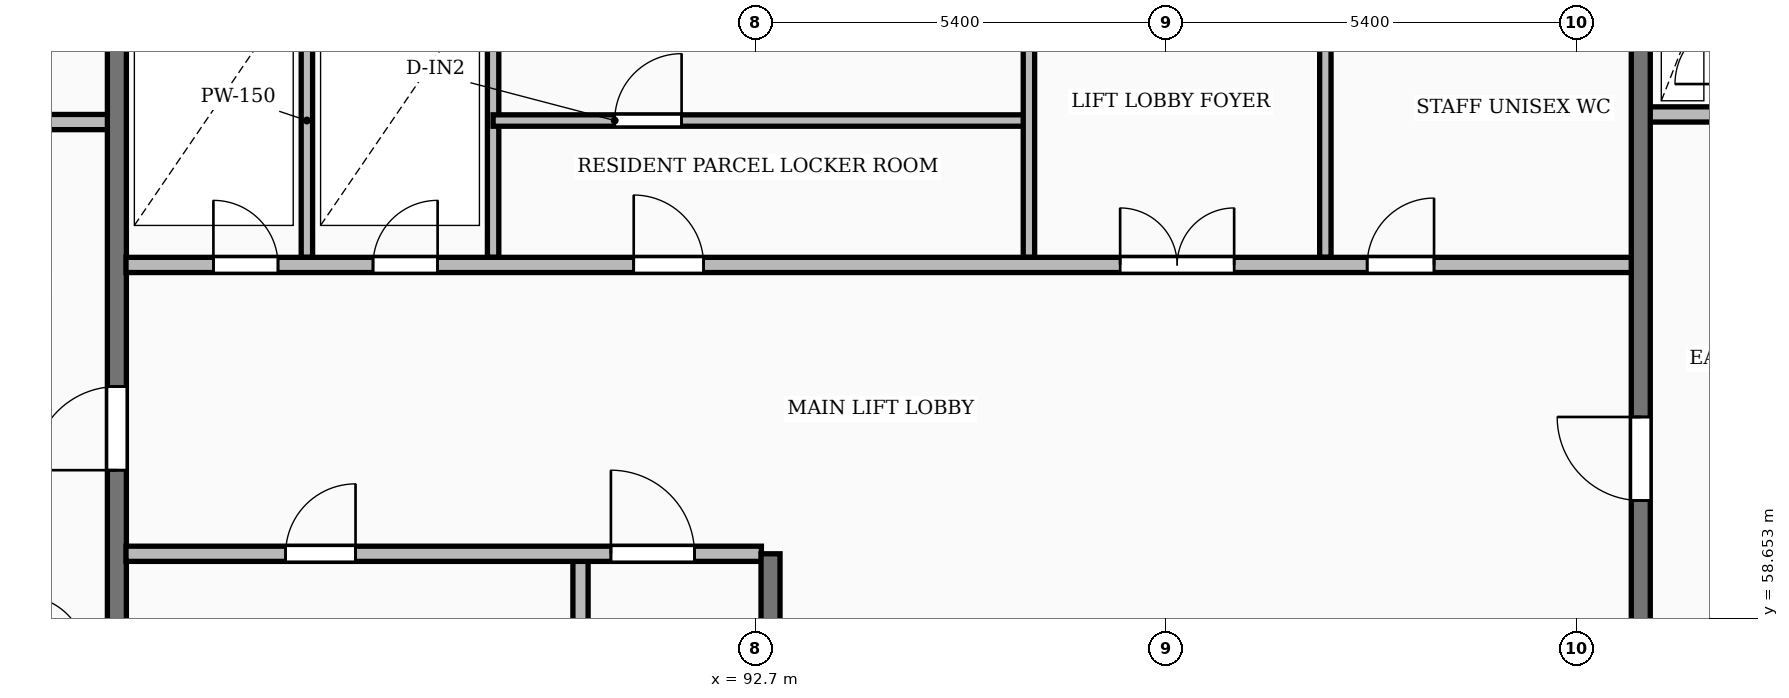
"""IFC4 building model, lengths in metres.
Left out: names, types, materials, properties, quantities, classifications, styles, units other than length and angle.
Written with IfcOpenShell. Run it as: python <this file> out.ifc"""

import sys

from ifc_helpers import new_model, si_unit, direction, frame, frame_2d, origin, place, context, subcontext, project, spatial, rectangle, extrude, element, fill, save


model = new_model("IFC4")
c1 = context("Model", 3, precision=1e-05, world=origin(), true_north=direction((0.0, 1.0)))
c2 = subcontext(c1, "Body", "Model", "MODEL_VIEW")
j1 = project(units=[si_unit("LENGTHUNIT", "METRE"), si_unit("PLANEANGLEUNIT", "RADIAN")], contexts=[c1])
p1 = place(None, origin())
s1 = spatial("IfcSite", under=j1, at=p1, CompositionType="ELEMENT")
p2 = place(p1, origin())
s2 = spatial("IfcBuilding", under=s1, at=p2, CompositionType="ELEMENT")
p3 = place(p2, frame((0.0, 0.0, 142.9)))
s3 = spatial("IfcBuildingStorey", under=s2, at=p3, CompositionType="ELEMENT", Elevation=142.9)
p4 = place(p3, frame((79.79, 65.18, 0.0), z_axis=(0.0, 0.0, 1.0), x_axis=(1.0, 0.0, 0.0)))
e1 = element("IfcWall", 1, at=p4, inside=s3, PredefinedType="PARTITIONING", context=c2, shape_type="SweptSolid", body=[
    extrude(rectangle(XDim=4.39, YDim=0.2, at=frame_2d((2.195, 0.0))), origin(), (0.0, 0.0, 1.0), 3.31),
])
p5 = place(p4, frame((1.5, 0.0, 0.0)))
e2 = element("IfcOpeningElement", 2, at=p5, cuts=e1, PredefinedType="OPENING", context=c2, shape_type="SweptSolid", body=[
    extrude(rectangle(XDim=1.1, YDim=2.1, at=frame_2d((0.55, 1.05))), frame((0.0, 0.11, 0.0), z_axis=(0.0, -1.0, 0.0), x_axis=(1.0, 0.0, 0.0)), (0.0, 0.0, 1.0), 0.22),
])
p6 = place(p3, frame((84.3, 55.4, 0.0), z_axis=(0.0, 0.0, 1.0), x_axis=(0.0, 1.0, 0.0)))
e3 = element("IfcWall", 3, at=p6, inside=s3, PredefinedType="SHEAR", context=c2, shape_type="SweptSolid", body=[
    extrude(rectangle(XDim=11.6, YDim=0.25, at=frame_2d((5.8, 0.0))), origin(), (0.0, 0.0, 1.0), 3.6),
])
p7 = place(p6, frame((5.2, 0.0, 0.0)))
e4 = element("IfcOpeningElement", 4, at=p7, cuts=e3, PredefinedType="OPENING", context=c2, shape_type="SweptSolid", body=[
    extrude(rectangle(XDim=1.1, YDim=2.1, at=frame_2d((0.55, 1.05))), frame((0.0, 0.135, 0.0), z_axis=(0.0, -1.0, 0.0), x_axis=(1.0, 0.0, 0.0)), (0.0, 0.0, 1.0), 0.27),
])
p8 = place(p3, frame((90.4, 55.4, 0.0), z_axis=(0.0, 0.0, 1.0), x_axis=(0.0, 1.0, 0.0)))
e5 = element("IfcWall", 5, at=p8, inside=s3, PredefinedType="PARTITIONING", context=c2, shape_type="SweptSolid", body=[
    extrude(rectangle(XDim=4.1, YDim=0.2, at=frame_2d((2.05, 0.0))), origin(), (0.0, 0.0, 1.0), 3.31),
])
p9 = place(p3, frame((84.42, 59.5, 0.0), z_axis=(0.0, 0.0, 1.0), x_axis=(1.0, 0.0, 0.0)))
e6 = element("IfcWall", 6, at=p9, inside=s3, PredefinedType="PARTITIONING", context=c2, shape_type="SweptSolid", body=[
    extrude(rectangle(XDim=8.36, YDim=0.2, at=frame_2d((4.18, 0.0))), origin(), (0.0, 0.0, 1.0), 3.31),
])
p10 = place(p9, frame((2.1, 0.0, 0.0)))
e7 = element("IfcOpeningElement", 7, at=p10, cuts=e6, PredefinedType="OPENING", context=c2, shape_type="SweptSolid", body=[
    extrude(rectangle(XDim=0.92, YDim=2.08, at=frame_2d((0.46, 1.04))), frame((0.0, 0.11, 0.0), z_axis=(0.0, -1.0, 0.0), x_axis=(1.0, 0.0, 0.0)), (0.0, 0.0, 1.0), 0.22),
])
p11 = place(p9, frame((6.38, 0.0, 0.0)))
e8 = element("IfcOpeningElement", 8, at=p11, cuts=e6, PredefinedType="OPENING", context=c2, shape_type="SweptSolid", body=[
    extrude(rectangle(XDim=1.1, YDim=2.1, at=frame_2d((0.55, 1.05))), frame((0.0, 0.11, 0.0), z_axis=(0.0, -1.0, 0.0), x_axis=(1.0, 0.0, 0.0)), (0.0, 0.0, 1.0), 0.22),
])
p12 = place(p3, frame((92.9, 55.4, 0.0), z_axis=(0.0, 0.0, 1.0), x_axis=(0.0, 1.0, 0.0)))
e9 = element("IfcWall", 9, at=p12, inside=s3, PredefinedType="SHEAR", context=c2, shape_type="SweptSolid", body=[
    extrude(rectangle(XDim=4.1, YDim=0.25, at=frame_2d((2.05, 0.0))), origin(), (0.0, 0.0, 1.0), 3.6),
])
for number, where, z_axis, x_axis in (
    (10, (86.8, 63.4, 0.0), (0.0, 0.0, 1.0), (0.0, 1.0, 0.0)),
    (11, (89.25, 63.4, 0.0), (0.0, 0.0, 1.0), (0.0, 1.0, 0.0)),
):
    element("IfcWall", number, at=place(p3, frame(where, z_axis=z_axis, x_axis=x_axis)), inside=s3, PredefinedType="PARTITIONING", context=c2, shape_type="SweptSolid", body=[
        extrude(rectangle(XDim=3.6, YDim=0.15, at=frame_2d((1.8, 0.0))), origin(), (0.0, 0.0, 1.0), 3.31),
    ])
p13 = place(p3, frame((89.25, 65.2, 0.0), z_axis=(0.0, 0.0, 1.0), x_axis=(1.0, 0.0, 0.0)))
e12 = element("IfcWall", 12, at=p13, inside=s3, PredefinedType="PARTITIONING", context=c2, shape_type="SweptSolid", body=[
    extrude(rectangle(XDim=7.05, YDim=0.15, at=frame_2d((3.525, 0.0))), origin(), (0.0, 0.0, 1.0), 3.31),
])
p14 = place(p13, frame((1.6, 0.0, 0.0)))
e13 = element("IfcOpeningElement", 13, at=p14, cuts=e12, PredefinedType="OPENING", context=c2, shape_type="SweptSolid", body=[
    extrude(rectangle(XDim=0.88, YDim=2.06, at=frame_2d((0.44, 1.03))), frame((0.0, 0.085, 0.0), z_axis=(0.0, -1.0, 0.0), x_axis=(1.0, 0.0, 0.0)), (0.0, 0.0, 1.0), 0.17),
])
for number, where, z_axis, x_axis in (
    (14, (96.3, 63.4, 0.0), (0.0, 0.0, 1.0), (0.0, 1.0, 0.0)),
    (15, (100.2, 63.4, 0.0), (0.0, 0.0, 1.0), (0.0, 1.0, 0.0)),
):
    element("IfcWall", number, at=place(p3, frame(where, z_axis=z_axis, x_axis=x_axis)), inside=s3, PredefinedType="PARTITIONING", context=c2, shape_type="SweptSolid", body=[
        extrude(rectangle(XDim=3.6, YDim=0.15, at=frame_2d((1.8, 0.0))), origin(), (0.0, 0.0, 1.0), 3.31),
    ])
p15 = place(p3, frame((84.42, 63.3, 0.0), z_axis=(0.0, 0.0, 1.0), x_axis=(1.0, 0.0, 0.0)))
e16 = element("IfcWall", 16, at=p15, inside=s3, PredefinedType="PARTITIONING", context=c2, shape_type="SweptSolid", body=[
    extrude(rectangle(XDim=19.83, YDim=0.2, at=frame_2d((9.915, 0.0))), origin(), (0.0, 0.0, 1.0), 3.31),
])
p16 = place(p15, frame((1.15, 0.0, 0.0)))
e17 = element("IfcOpeningElement", 17, at=p16, cuts=e16, PredefinedType="OPENING", context=c2, shape_type="SweptSolid", body=[
    extrude(rectangle(XDim=0.85, YDim=2.05, at=frame_2d((0.425, 1.025))), frame((0.0, 0.11, 0.0), z_axis=(0.0, -1.0, 0.0), x_axis=(1.0, 0.0, 0.0)), (0.0, 0.0, 1.0), 0.22),
])
p17 = place(p15, frame((3.25, 0.0, 0.0)))
e18 = element("IfcOpeningElement", 18, at=p17, cuts=e16, PredefinedType="OPENING", context=c2, shape_type="SweptSolid", body=[
    extrude(rectangle(XDim=0.85, YDim=2.05, at=frame_2d((0.425, 1.025))), frame((0.0, 0.11, 0.0), z_axis=(0.0, -1.0, 0.0), x_axis=(1.0, 0.0, 0.0)), (0.0, 0.0, 1.0), 0.22),
])
p18 = place(p15, frame((13.08, 0.0, 0.0)))
e19 = element("IfcOpeningElement", 19, at=p18, cuts=e16, PredefinedType="OPENING", context=c2, shape_type="SweptSolid", body=[
    extrude(rectangle(XDim=1.5, YDim=2.2, at=frame_2d((0.75, 1.1))), frame((0.0, 0.11, 0.0), z_axis=(0.0, -1.0, 0.0), x_axis=(1.0, 0.0, 0.0)), (0.0, 0.0, 1.0), 0.22),
])
p19 = place(p15, frame((6.68, 0.0, 0.0)))
e20 = element("IfcOpeningElement", 20, at=p19, cuts=e16, PredefinedType="OPENING", context=c2, shape_type="SweptSolid", body=[
    extrude(rectangle(XDim=0.92, YDim=2.08, at=frame_2d((0.46, 1.04))), frame((0.0, 0.11, 0.0), z_axis=(0.0, -1.0, 0.0), x_axis=(1.0, 0.0, 0.0)), (0.0, 0.0, 1.0), 0.22),
])
p20 = place(p15, frame((16.33, 0.0, 0.0)))
e21 = element("IfcOpeningElement", 21, at=p20, cuts=e16, PredefinedType="OPENING", context=c2, shape_type="SweptSolid", body=[
    extrude(rectangle(XDim=0.88, YDim=2.06, at=frame_2d((0.44, 1.03))), frame((0.0, 0.11, 0.0), z_axis=(0.0, -1.0, 0.0), x_axis=(1.0, 0.0, 0.0)), (0.0, 0.0, 1.0), 0.22),
])
p21 = place(p3, frame((104.45, 65.28, 0.0), z_axis=(0.0, 0.0, 1.0), x_axis=(1.0, 0.0, 0.0)))
e22 = element("IfcWall", 22, at=p21, inside=s3, PredefinedType="PARTITIONING", context=c2, shape_type="SweptSolid", body=[
    extrude(rectangle(XDim=1.2, YDim=0.2, at=frame_2d((0.6, 0.0))), origin(), (0.0, 0.0, 1.0), 3.31),
])
p22 = place(p3, frame((104.35, 58.4, 0.0), z_axis=(0.0, 0.0, 1.0), x_axis=(0.0, 1.0, 0.0)))
e23 = element("IfcWall", 23, at=p22, inside=s3, PredefinedType="SHEAR", context=c2, shape_type="SweptSolid", body=[
    extrude(rectangle(XDim=8.6, YDim=0.25, at=frame_2d((4.3, 0.0))), origin(), (0.0, 0.0, 1.0), 3.6),
])
p23 = place(p22, frame((1.8, 0.0, 0.0)))
e24 = element("IfcOpeningElement", 24, at=p23, cuts=e23, PredefinedType="OPENING", context=c2, shape_type="SweptSolid", body=[
    extrude(rectangle(XDim=1.1, YDim=2.1, at=frame_2d((0.55, 1.05))), frame((0.0, 0.135, 0.0), z_axis=(0.0, -1.0, 0.0), x_axis=(1.0, 0.0, 0.0)), (0.0, 0.0, 1.0), 0.27),
])
p24 = place(p7, origin())
e25 = element("IfcDoor", 25, at=p24, inside=s3, OperationType="SINGLE_SWING_LEFT", PredefinedType="DOOR", context=c2, shape_type="SweptSolid", body=[
    extrude(rectangle(XDim=1.1, YDim=2.1, at=frame_2d((0.55, 1.05))), frame((0.0, 0.025, 0.0), z_axis=(0.0, -1.0, 0.0), x_axis=(1.0, 0.0, 0.0)), (0.0, 0.0, 1.0), 0.05),
])
fill(e4, e25)
p25 = place(p10, origin())
e26 = element("IfcDoor", 26, at=p25, inside=s3, OperationType="SINGLE_SWING_RIGHT", PredefinedType="DOOR", context=c2, shape_type="SweptSolid", body=[
    extrude(rectangle(XDim=0.92, YDim=2.08, at=frame_2d((0.46, 1.04))), frame((0.0, 0.025, 0.0), z_axis=(0.0, -1.0, 0.0), x_axis=(1.0, 0.0, 0.0)), (0.0, 0.0, 1.0), 0.05),
])
fill(e7, e26)
p26 = place(p11, origin())
e27 = element("IfcDoor", 27, at=p26, inside=s3, OperationType="SINGLE_SWING_LEFT", PredefinedType="DOOR", context=c2, shape_type="SweptSolid", body=[
    extrude(rectangle(XDim=1.1, YDim=2.1, at=frame_2d((0.55, 1.05))), frame((0.0, 0.025, 0.0), z_axis=(0.0, -1.0, 0.0), x_axis=(1.0, 0.0, 0.0)), (0.0, 0.0, 1.0), 0.05),
])
fill(e8, e27)
p27 = place(p14, origin())
e28 = element("IfcDoor", 28, at=p27, inside=s3, OperationType="SINGLE_SWING_RIGHT", PredefinedType="DOOR", context=c2, shape_type="SweptSolid", body=[
    extrude(rectangle(XDim=0.88, YDim=2.06, at=frame_2d((0.44, 1.03))), frame((0.0, 0.025, 0.0), z_axis=(0.0, -1.0, 0.0), x_axis=(1.0, 0.0, 0.0)), (0.0, 0.0, 1.0), 0.05),
])
fill(e13, e28)
p28 = place(p16, origin())
e29 = element("IfcDoor", 29, at=p28, inside=s3, OperationType="SINGLE_SWING_LEFT", PredefinedType="DOOR", context=c2, shape_type="SweptSolid", body=[
    extrude(rectangle(XDim=0.85, YDim=2.05, at=frame_2d((0.425, 1.025))), frame((0.0, 0.025, 0.0), z_axis=(0.0, -1.0, 0.0), x_axis=(1.0, 0.0, 0.0)), (0.0, 0.0, 1.0), 0.05),
])
fill(e17, e29)
p29 = place(p17, origin())
e30 = element("IfcDoor", 30, at=p29, inside=s3, OperationType="SINGLE_SWING_RIGHT", PredefinedType="DOOR", context=c2, shape_type="SweptSolid", body=[
    extrude(rectangle(XDim=0.85, YDim=2.05, at=frame_2d((0.425, 1.025))), frame((0.0, 0.025, 0.0), z_axis=(0.0, -1.0, 0.0), x_axis=(1.0, 0.0, 0.0)), (0.0, 0.0, 1.0), 0.05),
])
fill(e18, e30)
p30 = place(p18, origin())
e31 = element("IfcDoor", 31, at=p30, inside=s3, OperationType="DOUBLE_DOOR_SINGLE_SWING", PredefinedType="DOOR", context=c2, shape_type="SweptSolid", body=[
    extrude(rectangle(XDim=1.5, YDim=2.2, at=frame_2d((0.75, 1.1))), frame((0.0, 0.025, 0.0), z_axis=(0.0, -1.0, 0.0), x_axis=(1.0, 0.0, 0.0)), (0.0, 0.0, 1.0), 0.05),
])
fill(e19, e31)
p31 = place(p19, origin())
e32 = element("IfcDoor", 32, at=p31, inside=s3, OperationType="SINGLE_SWING_LEFT", PredefinedType="DOOR", context=c2, shape_type="SweptSolid", body=[
    extrude(rectangle(XDim=0.92, YDim=2.08, at=frame_2d((0.46, 1.04))), frame((0.0, 0.025, 0.0), z_axis=(0.0, -1.0, 0.0), x_axis=(1.0, 0.0, 0.0)), (0.0, 0.0, 1.0), 0.05),
])
fill(e20, e32)
p32 = place(p20, origin())
e33 = element("IfcDoor", 33, at=p32, inside=s3, OperationType="SINGLE_SWING_RIGHT", PredefinedType="DOOR", context=c2, shape_type="SweptSolid", body=[
    extrude(rectangle(XDim=0.88, YDim=2.06, at=frame_2d((0.44, 1.03))), frame((0.0, 0.025, 0.0), z_axis=(0.0, -1.0, 0.0), x_axis=(1.0, 0.0, 0.0)), (0.0, 0.0, 1.0), 0.05),
])
fill(e21, e33)
p33 = place(p23, origin())
e34 = element("IfcDoor", 34, at=p33, inside=s3, OperationType="SINGLE_SWING_RIGHT", PredefinedType="DOOR", context=c2, shape_type="SweptSolid", body=[
    extrude(rectangle(XDim=1.1, YDim=2.1, at=frame_2d((0.55, 1.05))), frame((0.0, 0.025, 0.0), z_axis=(0.0, -1.0, 0.0), x_axis=(1.0, 0.0, 0.0)), (0.0, 0.0, 1.0), 0.05),
])
fill(e24, e34)
save(model, sys.argv[1])
